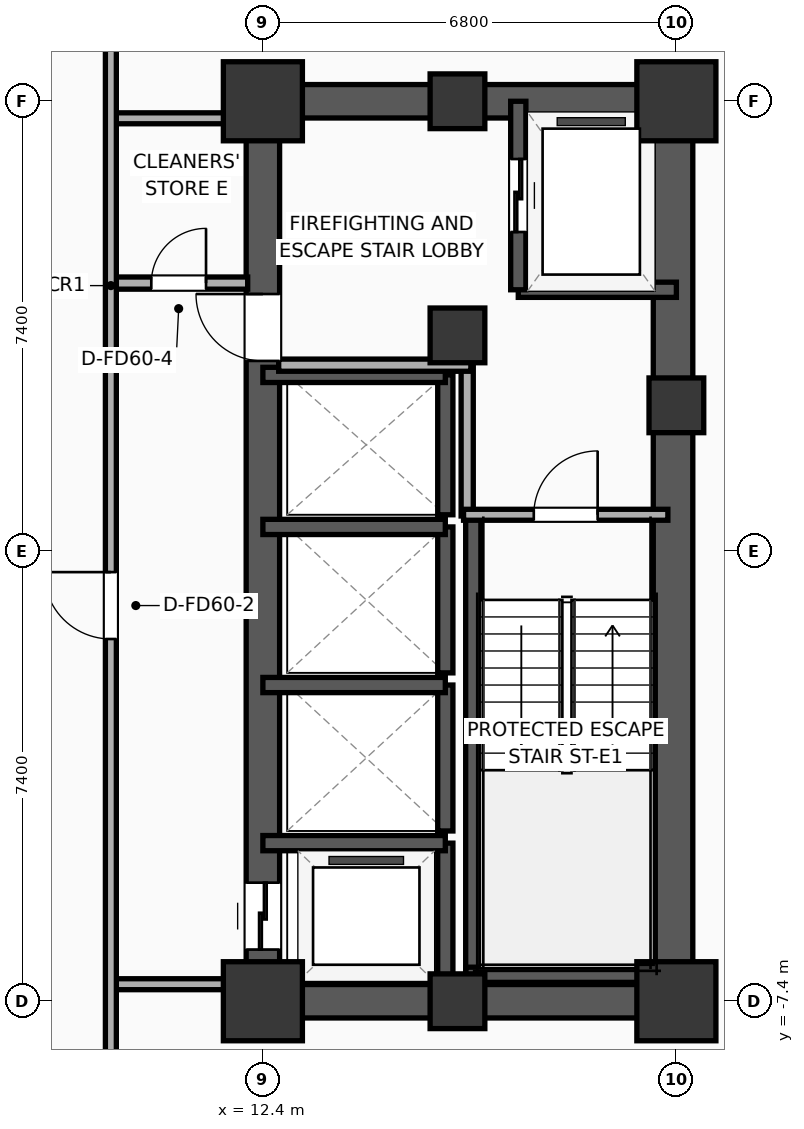
"""IFC4 building model, lengths in metres.
Left out: names, types, materials, properties, quantities, classifications, styles, units other than length and angle.
Written with IfcOpenShell. Run it as: python <this file> out.ifc"""

import sys

from ifc_helpers import new_model, si_unit, direction, frame, frame_2d, origin, origin_2d, place, context, subcontext, project, spatial, rectangle, extrude, element, fill, save


model = new_model("IFC4")
c1 = context("Model", 3, precision=1e-05, world=origin(), true_north=direction((0.0, 1.0)))
c2 = subcontext(c1, "Body", "Model", "MODEL_VIEW")
j1 = project(units=[si_unit("LENGTHUNIT", "METRE"), si_unit("PLANEANGLEUNIT", "RADIAN")], contexts=[c1])
p1 = place(None, origin())
s1 = spatial("IfcSite", under=j1, at=p1, CompositionType="ELEMENT")
p2 = place(p1, origin())
s2 = spatial("IfcBuilding", under=s1, at=p2, CompositionType="ELEMENT")
p3 = place(p2, frame((0.0, 0.0, 117.0)))
s3 = spatial("IfcBuildingStorey", under=s2, at=p3, CompositionType="ELEMENT", Elevation=117.0)
p4 = place(p3, frame((12.4, -7.4, 0.0), z_axis=(0.0, 0.0, 1.0), x_axis=(1.0, 0.0, 0.0)))
e1 = element("IfcColumn", 1, at=p4, inside=s3, PredefinedType="COLUMN", context=c2, shape_type="SweptSolid", body=[
    extrude(rectangle(XDim=1.3, YDim=1.3, at=origin_2d()), origin(), (0.0, 0.0, 1.0), 3.9),
])
p5 = place(p3, frame((15.6, 3.55, 0.0), z_axis=(0.0, 0.0, 1.0), x_axis=(1.0, 0.0, 0.0)))
e2 = element("IfcColumn", 2, at=p5, inside=s3, PredefinedType="COLUMN", context=c2, shape_type="SweptSolid", body=[
    extrude(rectangle(XDim=0.9, YDim=0.9, at=origin_2d()), origin(), (0.0, 0.0, 1.0), 3.9),
])
p6 = place(p3, frame((12.4, 7.4, 0.0), z_axis=(0.0, 0.0, 1.0), x_axis=(1.0, 0.0, 0.0)))
e3 = element("IfcColumn", 3, at=p6, inside=s3, PredefinedType="COLUMN", context=c2, shape_type="SweptSolid", body=[
    extrude(rectangle(XDim=1.3, YDim=1.3, at=origin_2d()), origin(), (0.0, 0.0, 1.0), 3.9),
])
for number, where, z_axis, x_axis in (
    (4, (15.6, -7.4, 0.0), (0.0, 0.0, 1.0), (1.0, 0.0, 0.0)),
    (5, (15.6, 7.4, 0.0), (0.0, 0.0, 1.0), (1.0, 0.0, 0.0)),
):
    element("IfcColumn", number, at=place(p3, frame(where, z_axis=z_axis, x_axis=x_axis)), inside=s3, PredefinedType="COLUMN", context=c2, shape_type="SweptSolid", body=[
        extrude(rectangle(XDim=0.9, YDim=0.9, at=origin_2d()), origin(), (0.0, 0.0, 1.0), 3.9),
    ])
p7 = place(p3, frame((19.2, -7.4, 0.0), z_axis=(0.0, 0.0, 1.0), x_axis=(1.0, 0.0, 0.0)))
e6 = element("IfcColumn", 6, at=p7, inside=s3, PredefinedType="COLUMN", context=c2, shape_type="SweptSolid", body=[
    extrude(rectangle(XDim=1.3, YDim=1.3, at=origin_2d()), origin(), (0.0, 0.0, 1.0), 3.9),
])
p8 = place(p3, frame((19.2, 2.4, 0.0), z_axis=(0.0, 0.0, 1.0), x_axis=(1.0, 0.0, 0.0)))
e7 = element("IfcColumn", 7, at=p8, inside=s3, PredefinedType="COLUMN", context=c2, shape_type="SweptSolid", body=[
    extrude(rectangle(XDim=0.9, YDim=0.9, at=origin_2d()), origin(), (0.0, 0.0, 1.0), 3.9),
])
p9 = place(p3, frame((19.2, 7.4, 0.0), z_axis=(0.0, 0.0, 1.0), x_axis=(1.0, 0.0, 0.0)))
e8 = element("IfcColumn", 8, at=p9, inside=s3, PredefinedType="COLUMN", context=c2, shape_type="SweptSolid", body=[
    extrude(rectangle(XDim=1.3, YDim=1.3, at=origin_2d()), origin(), (0.0, 0.0, 1.0), 3.9),
])
for number, where, z_axis, x_axis in (
    (9, (12.125, -7.4, 0.0), (0.0, 0.0, 1.0), (1.0, 0.0, 0.0)),
    (10, (12.125, 7.4, 0.0), (0.0, 0.0, 1.0), (1.0, 0.0, 0.0)),
):
    element("IfcWall", number, at=place(p3, frame(where, z_axis=z_axis, x_axis=x_axis)), inside=s3, PredefinedType="SHEAR", context=c2, shape_type="SweptSolid", body=[
        extrude(rectangle(XDim=7.35, YDim=0.55, at=frame_2d((3.675, 0.0))), origin(), (0.0, 0.0, 1.0), 3.65),
    ])
p10 = place(p3, frame((12.4, -7.4, 0.0), z_axis=(0.0, 0.0, 1.0), x_axis=(0.0, 1.0, 0.0)))
e11 = element("IfcWall", 11, at=p10, inside=s3, PredefinedType="SHEAR", context=c2, shape_type="SweptSolid", body=[
    extrude(rectangle(XDim=14.8, YDim=0.55, at=frame_2d((7.4, 0.0))), origin(), (0.0, 0.0, 1.0), 3.65),
])
p11 = place(p10, frame((0.85, 0.0, 0.0)))
e12 = element("IfcOpeningElement", 12, at=p11, cuts=e11, PredefinedType="OPENING", context=c2, shape_type="SweptSolid", body=[
    extrude(rectangle(XDim=1.1, YDim=2.05, at=frame_2d((0.55, 1.025))), frame((0.0, 0.285, 0.0), z_axis=(0.0, -1.0, 0.0), x_axis=(1.0, 0.0, 0.0)), (0.0, 0.0, 1.0), 0.57),
])
p12 = place(p10, frame((10.53, 0.0, 0.0)))
e13 = element("IfcOpeningElement", 13, at=p12, cuts=e11, PredefinedType="OPENING", context=c2, shape_type="SweptSolid", body=[
    extrude(rectangle(XDim=1.1, YDim=2.05, at=frame_2d((0.55, 1.025))), frame((0.0, 0.285, 0.0), z_axis=(0.0, -1.0, 0.0), x_axis=(1.0, 0.0, 0.0)), (0.0, 0.0, 1.0), 0.57),
])
p13 = place(p3, frame((19.145, -7.4, 0.0), z_axis=(0.0, 0.0, 1.0), x_axis=(0.0, 1.0, 0.0)))
e14 = element("IfcWall", 14, at=p13, inside=s3, PredefinedType="SHEAR", context=c2, shape_type="SweptSolid", body=[
    extrude(rectangle(XDim=14.8, YDim=0.65, at=frame_2d((7.4, 0.0))), origin(), (0.0, 0.0, 1.0), 3.65),
])
p14 = place(p3, frame((15.86, -7.085, 0.0), z_axis=(0.0, 0.0, 1.0), x_axis=(0.0, 1.0, 0.0)))
e15 = element("IfcWall", 15, at=p14, inside=s3, PredefinedType="SOLIDWALL", context=c2, shape_type="SweptSolid", body=[
    extrude(rectangle(XDim=7.685, YDim=0.25, at=frame_2d((3.843, 0.0))), origin(), (0.0, 0.0, 1.0), 3.65),
])
p15 = place(p3, frame((15.74, -6.965, 0.0), z_axis=(0.0, 0.0, 1.0), x_axis=(1.0, 0.0, 0.0)))
e16 = element("IfcWall", 16, at=p15, inside=s3, PredefinedType="SOLIDWALL", context=c2, shape_type="SweptSolid", body=[
    extrude(rectangle(XDim=3.46, YDim=0.25, at=frame_2d((1.73, 0.0))), origin(), (0.0, 0.0, 1.0), 3.65),
])
p16 = place(p3, frame((16.6, 4.3, 0.0), z_axis=(0.0, 0.0, 1.0), x_axis=(1.0, 0.0, 0.0)))
e17 = element("IfcWall", 17, at=p16, inside=s3, PredefinedType="SOLIDWALL", context=c2, shape_type="SweptSolid", body=[
    extrude(rectangle(XDim=2.6, YDim=0.25, at=frame_2d((1.3, 0.0))), origin(), (0.0, 0.0, 1.0), 3.65),
])
p17 = place(p3, frame((16.6, 7.4, 0.0), z_axis=(0.0, 0.0, 1.0), x_axis=(0.0, -1.0, 0.0)))
e18 = element("IfcWall", 18, at=p17, inside=s3, PredefinedType="SOLIDWALL", context=c2, shape_type="SweptSolid", body=[
    extrude(rectangle(XDim=3.1, YDim=0.25, at=frame_2d((1.55, 0.0))), origin(), (0.0, 0.0, 1.0), 3.65),
])
p18 = place(p17, frame((0.95, 0.0, 0.0)))
e19 = element("IfcOpeningElement", 19, at=p18, cuts=e18, PredefinedType="OPENING", context=c2, shape_type="SweptSolid", body=[
    extrude(rectangle(XDim=1.2, YDim=2.05, at=frame_2d((0.6, 1.025))), frame((0.0, 0.135, 0.0), z_axis=(0.0, -1.0, 0.0), x_axis=(1.0, 0.0, 0.0)), (0.0, 0.0, 1.0), 0.27),
])
p19 = place(p3, frame((15.4, -7.4, 0.0), z_axis=(0.0, 0.0, 1.0), x_axis=(0.0, 1.0, 0.0)))
e20 = element("IfcWall", 20, at=p19, inside=s3, PredefinedType="SOLIDWALL", context=c2, shape_type="SweptSolid", body=[
    extrude(rectangle(XDim=2.6, YDim=0.25, at=frame_2d((1.3, 0.0))), origin(), (0.0, 0.0, 1.0), 3.65),
])
p20 = place(p3, frame((15.4, -4.8, 0.0), z_axis=(0.0, 0.0, 1.0), x_axis=(-1.0, 0.0, 0.0)))
e21 = element("IfcWall", 21, at=p20, inside=s3, PredefinedType="SOLIDWALL", context=c2, shape_type="SweptSolid", body=[
    extrude(rectangle(XDim=3.0, YDim=0.25, at=frame_2d((1.5, 0.0))), origin(), (0.0, 0.0, 1.0), 3.65),
])
p21 = place(p3, frame((15.4, -4.6, 0.0), z_axis=(0.0, 0.0, 1.0), x_axis=(0.0, 1.0, 0.0)))
e22 = element("IfcWall", 22, at=p21, inside=s3, PredefinedType="SOLIDWALL", context=c2, shape_type="SweptSolid", body=[
    extrude(rectangle(XDim=2.4, YDim=0.25, at=frame_2d((1.2, 0.0))), origin(), (0.0, 0.0, 1.0), 3.65),
])
p22 = place(p3, frame((15.4, -2.2, 0.0), z_axis=(0.0, 0.0, 1.0), x_axis=(-1.0, 0.0, 0.0)))
e23 = element("IfcWall", 23, at=p22, inside=s3, PredefinedType="SOLIDWALL", context=c2, shape_type="SweptSolid", body=[
    extrude(rectangle(XDim=3.0, YDim=0.25, at=frame_2d((1.5, 0.0))), origin(), (0.0, 0.0, 1.0), 3.65),
])
p23 = place(p3, frame((15.4, -2.0, 0.0), z_axis=(0.0, 0.0, 1.0), x_axis=(0.0, 1.0, 0.0)))
e24 = element("IfcWall", 24, at=p23, inside=s3, PredefinedType="SOLIDWALL", context=c2, shape_type="SweptSolid", body=[
    extrude(rectangle(XDim=2.4, YDim=0.25, at=frame_2d((1.2, 0.0))), origin(), (0.0, 0.0, 1.0), 3.65),
])
p24 = place(p3, frame((15.4, 0.4, 0.0), z_axis=(0.0, 0.0, 1.0), x_axis=(-1.0, 0.0, 0.0)))
e25 = element("IfcWall", 25, at=p24, inside=s3, PredefinedType="SOLIDWALL", context=c2, shape_type="SweptSolid", body=[
    extrude(rectangle(XDim=3.0, YDim=0.25, at=frame_2d((1.5, 0.0))), origin(), (0.0, 0.0, 1.0), 3.65),
])
p25 = place(p3, frame((15.4, 0.6, 0.0), z_axis=(0.0, 0.0, 1.0), x_axis=(0.0, 1.0, 0.0)))
e26 = element("IfcWall", 26, at=p25, inside=s3, PredefinedType="SOLIDWALL", context=c2, shape_type="SweptSolid", body=[
    extrude(rectangle(XDim=2.3, YDim=0.25, at=frame_2d((1.15, 0.0))), origin(), (0.0, 0.0, 1.0), 3.65),
])
p26 = place(p3, frame((15.4, 2.9, 0.0), z_axis=(0.0, 0.0, 1.0), x_axis=(-1.0, 0.0, 0.0)))
e27 = element("IfcWall", 27, at=p26, inside=s3, PredefinedType="SOLIDWALL", context=c2, shape_type="SweptSolid", body=[
    extrude(rectangle(XDim=3.0, YDim=0.25, at=frame_2d((1.5, 0.0))), origin(), (0.0, 0.0, 1.0), 3.65),
])
p27 = place(p3, frame((15.76, 0.58, 0.0), z_axis=(0.0, 0.0, 1.0), x_axis=(0.0, 1.0, 0.0)))
e28 = element("IfcWall", 28, at=p27, inside=s3, PredefinedType="PARTITIONING", context=c2, shape_type="SweptSolid", body=[
    extrude(rectangle(XDim=2.52, YDim=0.2, at=frame_2d((1.26, 0.0))), origin(), (0.0, 0.0, 1.0), 3.65),
])
p28 = place(p3, frame((12.66, 3.06, 0.0), z_axis=(0.0, 0.0, 1.0), x_axis=(1.0, 0.0, 0.0)))
e29 = element("IfcWall", 29, at=p28, inside=s3, PredefinedType="PARTITIONING", context=c2, shape_type="SweptSolid", body=[
    extrude(rectangle(XDim=3.16, YDim=0.2, at=frame_2d((1.58, 0.0))), origin(), (0.0, 0.0, 1.0), 3.65),
])
p29 = place(p3, frame((15.7, 0.6, 0.0), z_axis=(0.0, 0.0, 1.0), x_axis=(1.0, 0.0, 0.0)))
e30 = element("IfcWall", 30, at=p29, inside=s3, PredefinedType="PARTITIONING", context=c2, shape_type="SweptSolid", body=[
    extrude(rectangle(XDim=3.36, YDim=0.18, at=frame_2d((1.68, 0.0))), origin(), (0.0, 0.0, 1.0), 3.65),
])
p30 = place(p29, frame((1.155, 0.0, 0.0)))
e31 = element("IfcOpeningElement", 31, at=p30, cuts=e30, PredefinedType="OPENING", context=c2, shape_type="SweptSolid", body=[
    extrude(rectangle(XDim=1.05, YDim=2.05, at=frame_2d((0.525, 1.025))), frame((0.0, 0.1, 0.0), z_axis=(0.0, -1.0, 0.0), x_axis=(1.0, 0.0, 0.0)), (0.0, 0.0, 1.0), 0.2),
])
p31 = place(p3, frame((9.88, 4.41, 0.0), z_axis=(0.0, 0.0, 1.0), x_axis=(1.0, 0.0, 0.0)))
e32 = element("IfcWall", 32, at=p31, inside=s3, PredefinedType="PARTITIONING", context=c2, shape_type="SweptSolid", body=[
    extrude(rectangle(XDim=2.27, YDim=0.2, at=frame_2d((1.135, 0.0))), origin(), (0.0, 0.0, 1.0), 3.65),
])
p32 = place(p31, frame((0.685, 0.0, 0.0)))
e33 = element("IfcOpeningElement", 33, at=p32, cuts=e32, PredefinedType="OPENING", context=c2, shape_type="SweptSolid", body=[
    extrude(rectangle(XDim=0.9, YDim=2.05, at=frame_2d((0.45, 1.025))), frame((0.0, 0.11, 0.0), z_axis=(0.0, -1.0, 0.0), x_axis=(1.0, 0.0, 0.0)), (0.0, 0.0, 1.0), 0.22),
])
for number, where, z_axis, x_axis in (
    (34, (9.88, 7.12, 0.0), (0.0, 0.0, 1.0), (1.0, 0.0, 0.0)),
    (35, (9.88, -7.12, 0.0), (0.0, 0.0, 1.0), (1.0, 0.0, 0.0)),
):
    element("IfcWall", number, at=place(p3, frame(where, z_axis=z_axis, x_axis=x_axis)), inside=s3, PredefinedType="PARTITIONING", context=c2, shape_type="SweptSolid", body=[
        extrude(rectangle(XDim=2.27, YDim=0.18, at=frame_2d((1.135, 0.0))), origin(), (0.0, 0.0, 1.0), 3.65),
    ])
p33 = place(p3, frame((9.9, -8.93, 0.0), z_axis=(0.0, 0.0, 1.0), x_axis=(0.0, 1.0, 0.0)))
e36 = element("IfcWall", 36, at=p33, inside=s3, PredefinedType="PARTITIONING", context=c2, shape_type="SweptSolid", body=[
    extrude(rectangle(XDim=17.86, YDim=0.18, at=frame_2d((8.93, 0.0))), origin(), (0.0, 0.0, 1.0), 3.65),
])
p34 = place(p33, frame((7.487, 0.0, 0.0)))
e37 = element("IfcOpeningElement", 37, at=p34, cuts=e36, PredefinedType="OPENING", context=c2, shape_type="SweptSolid", body=[
    extrude(rectangle(XDim=1.1, YDim=2.05, at=frame_2d((0.55, 1.025))), frame((0.0, 0.1, 0.0), z_axis=(0.0, -1.0, 0.0), x_axis=(1.0, 0.0, 0.0)), (0.0, 0.0, 1.0), 0.2),
])
p35 = place(p18, origin())
e38 = element("IfcDoor", 38, at=p35, inside=s3, OperationType="SLIDING_TO_LEFT", PredefinedType="DOOR", context=c2, shape_type="SweptSolid", body=[
    extrude(rectangle(XDim=1.2, YDim=2.05, at=frame_2d((0.6, 1.025))), frame((0.0, 0.025, 0.0), z_axis=(0.0, -1.0, 0.0), x_axis=(1.0, 0.0, 0.0)), (0.0, 0.0, 1.0), 0.05),
])
fill(e19, e38)
p36 = place(p11, origin())
e39 = element("IfcDoor", 39, at=p36, inside=s3, OperationType="SLIDING_TO_LEFT", PredefinedType="DOOR", context=c2, shape_type="SweptSolid", body=[
    extrude(rectangle(XDim=1.1, YDim=2.05, at=frame_2d((0.55, 1.025))), frame((0.0, 0.025, 0.0), z_axis=(0.0, -1.0, 0.0), x_axis=(1.0, 0.0, 0.0)), (0.0, 0.0, 1.0), 0.05),
])
fill(e12, e39)
p37 = place(p30, origin())
e40 = element("IfcDoor", 40, at=p37, inside=s3, OperationType="SINGLE_SWING_RIGHT", PredefinedType="DOOR", context=c2, shape_type="SweptSolid", body=[
    extrude(rectangle(XDim=1.05, YDim=2.05, at=frame_2d((0.525, 1.025))), frame((0.0, 0.025, 0.0), z_axis=(0.0, -1.0, 0.0), x_axis=(1.0, 0.0, 0.0)), (0.0, 0.0, 1.0), 0.05),
])
fill(e31, e40)
p38 = place(p32, origin())
e41 = element("IfcDoor", 41, at=p38, inside=s3, OperationType="SINGLE_SWING_RIGHT", PredefinedType="DOOR", context=c2, shape_type="SweptSolid", body=[
    extrude(rectangle(XDim=0.9, YDim=2.05, at=frame_2d((0.45, 1.025))), frame((0.0, 0.025, 0.0), z_axis=(0.0, -1.0, 0.0), x_axis=(1.0, 0.0, 0.0)), (0.0, 0.0, 1.0), 0.05),
])
fill(e33, e41)
p39 = place(p34, origin())
e42 = element("IfcDoor", 42, at=p39, inside=s3, OperationType="SINGLE_SWING_RIGHT", PredefinedType="DOOR", context=c2, shape_type="SweptSolid", body=[
    extrude(rectangle(XDim=1.1, YDim=2.05, at=frame_2d((0.55, 1.025))), frame((0.0, 0.025, 0.0), z_axis=(0.0, -1.0, 0.0), x_axis=(1.0, 0.0, 0.0)), (0.0, 0.0, 1.0), 0.05),
])
fill(e37, e42)
p40 = place(p12, origin())
e43 = element("IfcDoor", 43, at=p40, inside=s3, OperationType="SINGLE_SWING_RIGHT", PredefinedType="DOOR", context=c2, shape_type="SweptSolid", body=[
    extrude(rectangle(XDim=1.1, YDim=2.05, at=frame_2d((0.55, 1.025))), frame((0.0, 0.025, 0.0), z_axis=(0.0, -1.0, 0.0), x_axis=(1.0, 0.0, 0.0)), (0.0, 0.0, 1.0), 0.05),
])
fill(e13, e43)
save(model, sys.argv[1])
